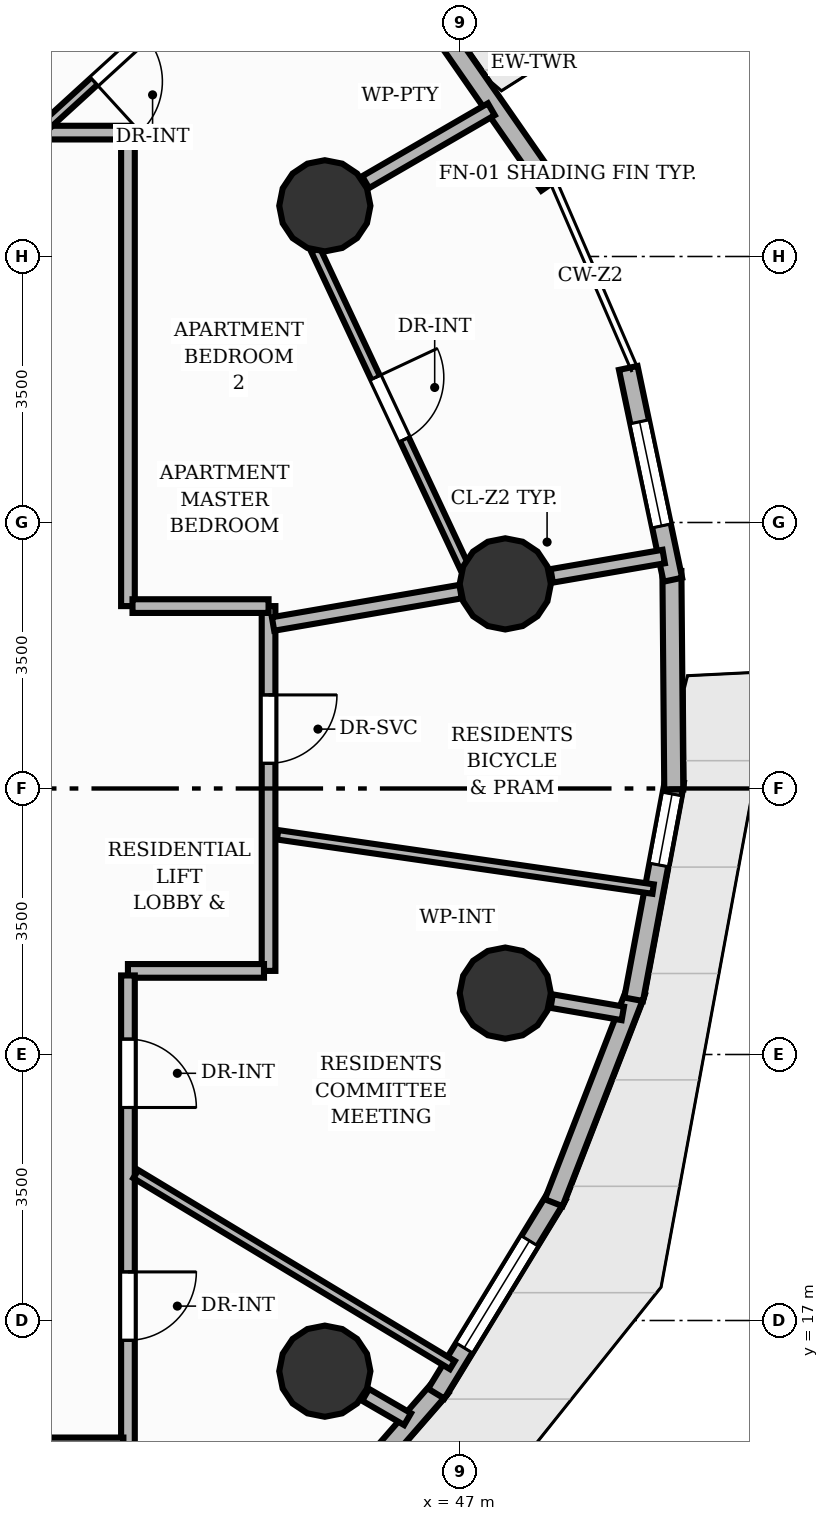
"""IFC4 building model, lengths in metres.
Left out: names, types, materials, properties, quantities, classifications, styles, units other than length and angle.
Written with IfcOpenShell. Run it as: python <this file> out.ifc"""

import sys

from ifc_helpers import new_model, si_unit, direction, frame, frame_2d, origin, origin_2d, place, context, subcontext, project, spatial, rectangle, circle, extrude, element, fill, save


model = new_model("IFC4")
c1 = context("Model", 3, precision=1e-05, world=origin(), true_north=direction((0.0, 1.0)))
c2 = subcontext(c1, "Body", "Model", "MODEL_VIEW")
j1 = project(units=[si_unit("LENGTHUNIT", "METRE"), si_unit("PLANEANGLEUNIT", "RADIAN")], contexts=[c1])
p1 = place(None, origin())
s1 = spatial("IfcSite", under=j1, at=p1, CompositionType="ELEMENT")
p2 = place(p1, origin())
s2 = spatial("IfcBuilding", under=s1, at=p2, CompositionType="ELEMENT")
p3 = place(p2, frame((0.0, 0.0, 80.48)))
s3 = spatial("IfcBuildingStorey", under=s2, at=p3, CompositionType="ELEMENT", Elevation=80.48)
for number, where, z_axis, x_axis in (
    (1, (47.594, 26.692, 0.0), (0.0, 0.0, 1.0), (1.0, 0.0, 0.0)),
    (2, (45.22, 31.667, 0.0), (0.0, 0.0, 1.0), (1.0, 0.0, 0.0)),
    (3, (45.22, 16.333, 0.0), (0.0, 0.0, 1.0), (1.0, 0.0, 0.0)),
    (4, (47.594, 21.308, 0.0), (0.0, 0.0, 1.0), (1.0, 0.0, 0.0)),
):
    element("IfcColumn", number, at=place(p3, frame(where, z_axis=z_axis, x_axis=x_axis)), inside=s3, PredefinedType="COLUMN", context=c2, shape_type="SweptSolid", body=[
        extrude(circle(Radius=0.6, at=origin_2d()), origin(), (0.0, 0.0, 1.0), 3.2),
    ])
p4 = place(p3, frame((46.532, 34.298, 0.0), z_axis=(0.0, 0.0, 1.0), x_axis=(0.570574087236, -0.821246133005, 0.0)))
e5 = element("IfcWall", 5, at=p4, inside=s3, PredefinedType="SOLIDWALL", context=c2, shape_type="SweptSolid", body=[
    extrude(rectangle(XDim=2.874, YDim=0.25, at=frame_2d((1.437, 0.0))), origin(), (0.0, 0.0, 1.0), 2.96),
])
p5 = place(p3, frame((46.752, 16.127, 0.0), z_axis=(0.0, 0.0, 1.0), x_axis=(-0.656940925155, -0.753942054044, 0.0)))
e6 = element("IfcWall", 6, at=p5, inside=s3, PredefinedType="SOLIDWALL", context=c2, shape_type="SweptSolid", body=[
    extrude(rectangle(XDim=3.131, YDim=0.25, at=frame_2d((1.565, 0.0))), origin(), (0.0, 0.0, 1.0), 2.96),
])
p6 = place(p3, frame((48.281, 18.65, 0.0), z_axis=(0.0, 0.0, 1.0), x_axis=(-0.520956264952, -0.853583370273, 0.0)))
e7 = element("IfcWall", 7, at=p6, inside=s3, PredefinedType="SOLIDWALL", context=c2, shape_type="SweptSolid", body=[
    extrude(rectangle(XDim=3.061, YDim=0.25, at=frame_2d((1.53, 0.0))), origin(), (0.0, 0.0, 1.0), 2.96),
])
p7 = place(p6, frame((0.705, 0.0, 0.85)))
e8 = element("IfcOpeningElement", 8, at=p7, cuts=e7, PredefinedType="OPENING", context=c2, shape_type="SweptSolid", body=[
    extrude(rectangle(XDim=1.65, YDim=1.55, at=frame_2d((0.825, 0.775))), frame((0.0, 0.135, 0.0), z_axis=(0.0, -1.0, 0.0), x_axis=(1.0, 0.0, 0.0)), (0.0, 0.0, 1.0), 0.27),
])
p8 = place(p3, frame((49.314, 21.335, 0.0), z_axis=(0.0, 0.0, 1.0), x_axis=(-0.362414720493, -0.93201693674, 0.0)))
e9 = element("IfcWall", 9, at=p8, inside=s3, PredefinedType="SOLIDWALL", context=c2, shape_type="SweptSolid", body=[
    extrude(rectangle(XDim=2.988, YDim=0.25, at=frame_2d((1.494, 0.0))), origin(), (0.0, 0.0, 1.0), 2.96),
])
p9 = place(p3, frame((49.821, 24.1, 0.0), z_axis=(0.0, 0.0, 1.0), x_axis=(-0.183975908968, -0.982930752861, 0.0)))
e10 = element("IfcWall", 10, at=p9, inside=s3, PredefinedType="SOLIDWALL", context=c2, shape_type="SweptSolid", body=[
    extrude(rectangle(XDim=2.923, YDim=0.25, at=frame_2d((1.462, 0.0))), origin(), (0.0, 0.0, 1.0), 2.96),
])
p10 = place(p9, frame((0.175, 0.0, 0.85)))
e11 = element("IfcOpeningElement", 11, at=p10, cuts=e10, PredefinedType="OPENING", context=c2, shape_type="SweptSolid", body=[
    extrude(rectangle(XDim=0.95, YDim=1.45, at=frame_2d((0.475, 0.725))), frame((0.0, 0.135, 0.0), z_axis=(0.0, -1.0, 0.0), x_axis=(1.0, 0.0, 0.0)), (0.0, 0.0, 1.0), 0.27),
])
p11 = place(p3, frame((49.787, 26.861, 0.0), z_axis=(0.0, 0.0, 1.0), x_axis=(0.008580093639, -0.999963190319, 0.0)))
e12 = element("IfcWall", 12, at=p11, inside=s3, PredefinedType="SOLIDWALL", context=c2, shape_type="SweptSolid", body=[
    extrude(rectangle(XDim=2.874, YDim=0.25, at=frame_2d((1.437, 0.0))), origin(), (0.0, 0.0, 1.0), 2.96),
])
p12 = place(p3, frame((49.213, 29.533, 0.0), z_axis=(0.0, 0.0, 1.0), x_axis=(0.205949984324, -0.978562519187, 0.0)))
e13 = element("IfcWall", 13, at=p12, inside=s3, PredefinedType="SOLIDWALL", context=c2, shape_type="SweptSolid", body=[
    extrude(rectangle(XDim=2.847, YDim=0.25, at=frame_2d((1.424, 0.0))), origin(), (0.0, 0.0, 1.0), 2.96),
])
p13 = place(p12, frame((0.724, 0.0, 0.85)))
e14 = element("IfcOpeningElement", 14, at=p13, cuts=e13, PredefinedType="OPENING", context=c2, shape_type="SweptSolid", body=[
    extrude(rectangle(XDim=1.4, YDim=1.55, at=frame_2d((0.7, 0.775))), frame((0.0, 0.135, 0.0), z_axis=(0.0, -1.0, 0.0), x_axis=(1.0, 0.0, 0.0)), (0.0, 0.0, 1.0), 0.27),
])
p14 = place(p3, frame((48.206, 26.798, 0.0), z_axis=(0.0, 0.0, 1.0), x_axis=(0.985414821555, 0.170169413997, 0.0)))
e15 = element("IfcWall", 15, at=p14, inside=s3, PredefinedType="PARTITIONING", context=c2, shape_type="SweptSolid", body=[
    extrude(rectangle(XDim=1.495, YDim=0.18, at=frame_2d((0.748, 0.0))), origin(), (0.0, 0.0, 1.0), 2.26),
])
p15 = place(p3, frame((45.757, 31.978, 0.0), z_axis=(0.0, 0.0, 1.0), x_axis=(0.86503562166, 0.501710447628, 0.0)))
e16 = element("IfcWall", 16, at=p15, inside=s3, PredefinedType="PARTITIONING", context=c2, shape_type="SweptSolid", body=[
    extrude(rectangle(XDim=1.912, YDim=0.18, at=frame_2d((0.956, 0.0))), origin(), (0.0, 0.0, 1.0), 2.26),
])
p16 = place(p3, frame((45.757, 16.022, 0.0), z_axis=(0.0, 0.0, 1.0), x_axis=(0.864928236137, -0.501895553212, 0.0)))
e17 = element("IfcWall", 17, at=p16, inside=s3, PredefinedType="PARTITIONING", context=c2, shape_type="SweptSolid", body=[
    extrude(rectangle(XDim=0.638, YDim=0.18, at=frame_2d((0.319, 0.0))), origin(), (0.0, 0.0, 1.0), 2.26),
])
p17 = place(p3, frame((48.206, 21.202, 0.0), z_axis=(0.0, 0.0, 1.0), x_axis=(0.985396187556, -0.170277284302, 0.0)))
e18 = element("IfcWall", 18, at=p17, inside=s3, PredefinedType="PARTITIONING", context=c2, shape_type="SweptSolid", body=[
    extrude(rectangle(XDim=0.949, YDim=0.18, at=frame_2d((0.475, 0.0))), origin(), (0.0, 0.0, 1.0), 2.26),
])
p18 = place(p3, frame((44.48, 26.4, 0.0), z_axis=(0.0, 0.0, 1.0), x_axis=(0.0, -1.0, 0.0)))
e19 = element("IfcWall", 19, at=p18, inside=s3, PredefinedType="PARTITIONING", context=c2, shape_type="SweptSolid", body=[
    extrude(rectangle(XDim=4.8, YDim=0.18, at=frame_2d((2.4, 0.0))), origin(), (0.0, 0.0, 1.0), 2.955),
])
p19 = place(p18, frame((1.169, 0.0, 0.0)))
e20 = element("IfcOpeningElement", 20, at=p19, cuts=e19, PredefinedType="OPENING", context=c2, shape_type="SweptSolid", body=[
    extrude(rectangle(XDim=0.9, YDim=2.1, at=frame_2d((0.45, 1.05))), frame((0.0, 0.1, 0.0), z_axis=(0.0, -1.0, 0.0), x_axis=(1.0, 0.0, 0.0)), (0.0, 0.0, 1.0), 0.2),
])
p20 = place(p3, frame((44.42, 21.6, 0.0), z_axis=(0.0, 0.0, 1.0), x_axis=(-1.0, 0.0, 0.0)))
e21 = element("IfcWall", 21, at=p20, inside=s3, PredefinedType="PARTITIONING", context=c2, shape_type="SweptSolid", body=[
    extrude(rectangle(XDim=1.79, YDim=0.18, at=frame_2d((0.895, 0.0))), origin(), (0.0, 0.0, 1.0), 2.26),
])
p21 = place(p3, frame((42.63, 21.54, 0.0), z_axis=(0.0, 0.0, 1.0), x_axis=(0.0, -1.0, 0.0)))
e22 = element("IfcWall", 22, at=p21, inside=s3, PredefinedType="PARTITIONING", context=c2, shape_type="SweptSolid", body=[
    extrude(rectangle(XDim=6.17, YDim=0.18, at=frame_2d((3.085, 0.0))), origin(), (0.0, 0.0, 1.0), 2.955),
])
p22 = place(p21, frame((0.837, 0.0, 0.0)))
e23 = element("IfcOpeningElement", 23, at=p22, cuts=e22, PredefinedType="OPENING", context=c2, shape_type="SweptSolid", body=[
    extrude(rectangle(XDim=0.9, YDim=2.1, at=frame_2d((0.45, 1.05))), frame((0.0, 0.1, 0.0), z_axis=(0.0, -1.0, 0.0), x_axis=(1.0, 0.0, 0.0)), (0.0, 0.0, 1.0), 0.2),
])
p23 = place(p21, frame((3.901, 0.0, 0.0)))
e24 = element("IfcOpeningElement", 24, at=p23, cuts=e22, PredefinedType="OPENING", context=c2, shape_type="SweptSolid", body=[
    extrude(rectangle(XDim=0.9, YDim=2.1, at=frame_2d((0.45, 1.05))), frame((0.0, 0.1, 0.0), z_axis=(0.0, -1.0, 0.0), x_axis=(1.0, 0.0, 0.0)), (0.0, 0.0, 1.0), 0.2),
])
p24 = place(p3, frame((42.57, 15.37, 0.0), z_axis=(0.0, 0.0, 1.0), x_axis=(-1.0, 0.0, 0.0)))
e25 = element("IfcWall", 25, at=p24, inside=s3, PredefinedType="PARTITIONING", context=c2, shape_type="SweptSolid", body=[
    extrude(rectangle(XDim=11.879, YDim=0.18, at=frame_2d((5.939, 0.0))), origin(), (0.0, 0.0, 1.0), 2.955),
])
p25 = place(p24, frame((3.365, 0.0, 0.0)))
e26 = element("IfcOpeningElement", 26, at=p25, cuts=e25, PredefinedType="OPENING", context=c2, shape_type="SweptSolid", body=[
    extrude(rectangle(XDim=0.9, YDim=2.1, at=frame_2d((0.45, 1.05))), frame((0.0, 0.1, 0.0), z_axis=(0.0, -1.0, 0.0), x_axis=(1.0, 0.0, 0.0)), (0.0, 0.0, 1.0), 0.2),
])
p26 = place(p24, frame((6.308, 0.0, 0.0)))
e27 = element("IfcOpeningElement", 27, at=p26, cuts=e25, PredefinedType="OPENING", context=c2, shape_type="SweptSolid", body=[
    extrude(rectangle(XDim=0.9, YDim=2.1, at=frame_2d((0.45, 1.05))), frame((0.0, 0.1, 0.0), z_axis=(0.0, -1.0, 0.0), x_axis=(1.0, 0.0, 0.0)), (0.0, 0.0, 1.0), 0.2),
])
p27 = place(p3, frame((26.431, 32.63, 0.0), z_axis=(0.0, 0.0, 1.0), x_axis=(1.0, 0.0, 0.0)))
e28 = element("IfcWall", 28, at=p27, inside=s3, PredefinedType="PARTITIONING", context=c2, shape_type="SweptSolid", body=[
    extrude(rectangle(XDim=16.199, YDim=0.18, at=frame_2d((8.099, 0.0))), origin(), (0.0, 0.0, 1.0), 2.955),
])
p28 = place(p27, frame((11.645, 0.0, 0.0)))
e29 = element("IfcOpeningElement", 29, at=p28, cuts=e28, PredefinedType="OPENING", context=c2, shape_type="SweptSolid", body=[
    extrude(rectangle(XDim=1.05, YDim=2.15, at=frame_2d((0.525, 1.075))), frame((0.0, 0.1, 0.0), z_axis=(0.0, -1.0, 0.0), x_axis=(1.0, 0.0, 0.0)), (0.0, 0.0, 1.0), 0.2),
])
p29 = place(p3, frame((42.63, 32.63, 0.0), z_axis=(0.0, 0.0, 1.0), x_axis=(0.0, -1.0, 0.0)))
e30 = element("IfcWall", 30, at=p29, inside=s3, PredefinedType="PARTITIONING", context=c2, shape_type="SweptSolid", body=[
    extrude(rectangle(XDim=6.23, YDim=0.18, at=frame_2d((3.115, 0.0))), origin(), (0.0, 0.0, 1.0), 2.955),
])
p30 = place(p3, frame((42.69, 26.4, 0.0), z_axis=(0.0, 0.0, 1.0), x_axis=(1.0, 0.0, 0.0)))
e31 = element("IfcWall", 31, at=p30, inside=s3, PredefinedType="PARTITIONING", context=c2, shape_type="SweptSolid", body=[
    extrude(rectangle(XDim=1.79, YDim=0.18, at=frame_2d((0.895, 0.0))), origin(), (0.0, 0.0, 1.0), 2.26),
])
p31 = place(p3, frame((49.54, 22.677, 0.0), z_axis=(0.0, 0.0, 1.0), x_axis=(-0.989708433574, 0.143098625124, 0.0)))
e32 = element("IfcWall", 32, at=p31, inside=s3, PredefinedType="PARTITIONING", context=c2, shape_type="SweptSolid", body=[
    extrude(rectangle(XDim=4.992, YDim=0.125, at=frame_2d((2.496, 0.0))), origin(), (0.0, 0.0, 1.0), 2.641),
])
p32 = place(p3, frame((44.539, 26.165, 0.0), z_axis=(0.0, 0.0, 1.0), x_axis=(0.985420684403, 0.170135460006, 0.0)))
e33 = element("IfcWall", 33, at=p32, inside=s3, PredefinedType="PARTITIONING", context=c2, shape_type="SweptSolid", body=[
    extrude(rectangle(XDim=2.504, YDim=0.18, at=frame_2d((1.252, 0.0))), origin(), (0.0, 0.0, 1.0), 2.26),
])
p33 = place(p3, frame((46.898, 16.414, 0.0), z_axis=(0.0, 0.0, 1.0), x_axis=(-0.856255019026, 0.51655332967, 0.0)))
e34 = element("IfcWall", 34, at=p33, inside=s3, PredefinedType="PARTITIONING", context=c2, shape_type="SweptSolid", body=[
    extrude(rectangle(XDim=4.865, YDim=0.125, at=frame_2d((2.432, 0.0))), origin(), (0.0, 0.0, 1.0), 2.955),
])
p34 = place(p3, frame((43.511, 34.516, 0.0), z_axis=(0.0, 0.0, 1.0), x_axis=(-0.738303163636, -0.674469004896, 0.0)))
e35 = element("IfcWall", 35, at=p34, inside=s3, PredefinedType="PARTITIONING", context=c2, shape_type="SweptSolid", body=[
    extrude(rectangle(XDim=2.696, YDim=0.125, at=frame_2d((1.348, 0.0))), origin(), (0.0, 0.0, 1.0), 2.955),
])
p35 = place(p34, frame((0.898, 0.0, 0.0)))
e36 = element("IfcOpeningElement", 36, at=p35, cuts=e35, PredefinedType="OPENING", context=c2, shape_type="SweptSolid", body=[
    extrude(rectangle(XDim=0.9, YDim=2.1, at=frame_2d((0.45, 1.05))), frame((0.0, 0.073, 0.0), z_axis=(0.0, -1.0, 0.0), x_axis=(1.0, 0.0, 0.0)), (0.0, 0.0, 1.0), 0.145),
])
p36 = place(p3, frame((45.098, 31.087, 0.0), z_axis=(0.0, 0.0, 1.0), x_axis=(0.424725570062, -0.905322147158, 0.0)))
e37 = element("IfcWall", 37, at=p36, inside=s3, PredefinedType="PARTITIONING", context=c2, shape_type="SweptSolid", body=[
    extrude(rectangle(XDim=4.61, YDim=0.125, at=frame_2d((2.305, 0.0))), origin(), (0.0, 0.0, 1.0), 2.955),
])
p37 = place(p36, frame((1.855, 0.0, 0.0)))
e38 = element("IfcOpeningElement", 38, at=p37, cuts=e37, PredefinedType="OPENING", context=c2, shape_type="SweptSolid", body=[
    extrude(rectangle(XDim=0.9, YDim=2.1, at=frame_2d((0.45, 1.05))), frame((0.0, 0.073, 0.0), z_axis=(0.0, -1.0, 0.0), x_axis=(1.0, 0.0, 0.0)), (0.0, 0.0, 1.0), 0.145),
])
p38 = place(p7, origin())
e39 = element("IfcWindow", 39, at=p38, inside=s3, PartitioningType="SINGLE_PANEL", PredefinedType="WINDOW", context=c2, shape_type="SweptSolid", body=[
    extrude(rectangle(XDim=1.65, YDim=1.55, at=frame_2d((0.825, 0.775))), frame((0.0, 0.03, 0.0), z_axis=(0.0, -1.0, 0.0), x_axis=(1.0, 0.0, 0.0)), (0.0, 0.0, 1.0), 0.06),
])
fill(e8, e39)
p39 = place(p10, origin())
e40 = element("IfcWindow", 40, at=p39, inside=s3, PartitioningType="SINGLE_PANEL", PredefinedType="WINDOW", context=c2, shape_type="SweptSolid", body=[
    extrude(rectangle(XDim=0.95, YDim=1.45, at=frame_2d((0.475, 0.725))), frame((0.0, 0.03, 0.0), z_axis=(0.0, -1.0, 0.0), x_axis=(1.0, 0.0, 0.0)), (0.0, 0.0, 1.0), 0.06),
])
fill(e11, e40)
p40 = place(p13, origin())
e41 = element("IfcWindow", 41, at=p40, inside=s3, PartitioningType="SINGLE_PANEL", PredefinedType="WINDOW", context=c2, shape_type="SweptSolid", body=[
    extrude(rectangle(XDim=1.4, YDim=1.55, at=frame_2d((0.7, 0.775))), frame((0.0, 0.03, 0.0), z_axis=(0.0, -1.0, 0.0), x_axis=(1.0, 0.0, 0.0)), (0.0, 0.0, 1.0), 0.06),
])
fill(e14, e41)
p41 = place(p19, origin())
e42 = element("IfcDoor", 42, at=p41, inside=s3, OperationType="SINGLE_SWING_LEFT", PredefinedType="DOOR", context=c2, shape_type="SweptSolid", body=[
    extrude(rectangle(XDim=0.9, YDim=2.1, at=frame_2d((0.45, 1.05))), frame((0.0, 0.025, 0.0), z_axis=(0.0, -1.0, 0.0), x_axis=(1.0, 0.0, 0.0)), (0.0, 0.0, 1.0), 0.05),
])
fill(e20, e42)
p42 = place(p22, origin())
e43 = element("IfcDoor", 43, at=p42, inside=s3, OperationType="SINGLE_SWING_RIGHT", PredefinedType="DOOR", context=c2, shape_type="SweptSolid", body=[
    extrude(rectangle(XDim=0.9, YDim=2.1, at=frame_2d((0.45, 1.05))), frame((0.0, 0.025, 0.0), z_axis=(0.0, -1.0, 0.0), x_axis=(1.0, 0.0, 0.0)), (0.0, 0.0, 1.0), 0.05),
])
fill(e23, e43)
p43 = place(p23, origin())
e44 = element("IfcDoor", 44, at=p43, inside=s3, OperationType="SINGLE_SWING_LEFT", PredefinedType="DOOR", context=c2, shape_type="SweptSolid", body=[
    extrude(rectangle(XDim=0.9, YDim=2.1, at=frame_2d((0.45, 1.05))), frame((0.0, 0.025, 0.0), z_axis=(0.0, -1.0, 0.0), x_axis=(1.0, 0.0, 0.0)), (0.0, 0.0, 1.0), 0.05),
])
fill(e24, e44)
p44 = place(p35, origin())
e45 = element("IfcDoor", 45, at=p44, inside=s3, OperationType="SINGLE_SWING_RIGHT", PredefinedType="DOOR", context=c2, shape_type="SweptSolid", body=[
    extrude(rectangle(XDim=0.9, YDim=2.1, at=frame_2d((0.45, 1.05))), frame((0.0, 0.025, 0.0), z_axis=(0.0, -1.0, 0.0), x_axis=(1.0, 0.0, 0.0)), (0.0, 0.0, 1.0), 0.05),
])
fill(e36, e45)
p45 = place(p37, origin())
e46 = element("IfcDoor", 46, at=p45, inside=s3, OperationType="SINGLE_SWING_LEFT", PredefinedType="DOOR", context=c2, shape_type="SweptSolid", body=[
    extrude(rectangle(XDim=0.9, YDim=2.1, at=frame_2d((0.45, 1.05))), frame((0.0, 0.025, 0.0), z_axis=(0.0, -1.0, 0.0), x_axis=(1.0, 0.0, 0.0)), (0.0, 0.0, 1.0), 0.05),
])
fill(e38, e46)
save(model, sys.argv[1])
